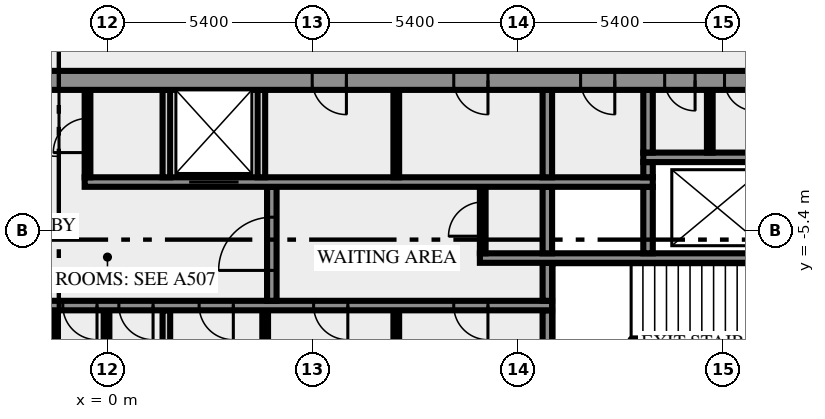
"""IFC4 building model, lengths in metres.
Left out: names, types, materials, properties, quantities, classifications, styles, units other than length and angle.
Written with IfcOpenShell. Run it as: python <this file> out.ifc"""

import sys

from ifc_helpers import new_model, si_unit, direction, frame, frame_2d, origin, place, context, subcontext, project, spatial, rectangle, extrude, element, fill, save


model = new_model("IFC4")
c1 = context("Model", 3, precision=1e-05, world=origin(), true_north=direction((0.0, 1.0)))
c2 = subcontext(c1, "Body", "Model", "MODEL_VIEW")
j1 = project(units=[si_unit("LENGTHUNIT", "METRE"), si_unit("PLANEANGLEUNIT", "RADIAN")], contexts=[c1])
p1 = place(None, origin())
s1 = spatial("IfcSite", under=j1, at=p1, CompositionType="ELEMENT")
p2 = place(p1, origin())
s2 = spatial("IfcBuilding", under=s1, at=p2, CompositionType="ELEMENT")
p3 = place(p2, frame((0.0, 0.0, 261.0)))
s3 = spatial("IfcBuildingStorey", under=s2, at=p3, CompositionType="ELEMENT", Elevation=261.0)
for number, where, z_axis, x_axis in (
    (1, (-1.425, -10.5, 0.0), (0.0, 0.0, 1.0), (0.0, 1.0, 0.0)),
    (2, (-0.025, -10.5, 0.0), (0.0, 0.0, 1.0), (0.0, 1.0, 0.0)),
):
    element("IfcWall", number, at=place(p3, frame(where, z_axis=z_axis, x_axis=x_axis)), inside=s3, PredefinedType="PARTITIONING", context=c2, shape_type="SweptSolid", body=[
        extrude(rectangle(XDim=3.0, YDim=0.15, at=frame_2d((1.5, 0.0))), origin(), (0.0, 0.0, 1.0), 3.65),
    ])
p4 = place(p3, frame((1.55, -10.5, 0.0), z_axis=(0.0, 0.0, 1.0), x_axis=(0.0, 1.0, 0.0)))
e3 = element("IfcWall", 3, at=p4, inside=s3, PredefinedType="SOLIDWALL", context=c2, shape_type="SweptSolid", body=[
    extrude(rectangle(XDim=3.0, YDim=0.2, at=frame_2d((1.5, 0.0))), origin(), (0.0, 0.0, 1.0), 3.65),
])
for number, where, z_axis, x_axis in (
    (4, (4.15, -10.5, 0.0), (0.0, 0.0, 1.0), (0.0, 1.0, 0.0)),
    (5, (7.6, -10.5, 0.0), (0.0, 0.0, 1.0), (0.0, 1.0, 0.0)),
):
    element("IfcWall", number, at=place(p3, frame(where, z_axis=z_axis, x_axis=x_axis)), inside=s3, PredefinedType="PARTITIONING", context=c2, shape_type="SweptSolid", body=[
        extrude(rectangle(XDim=3.0, YDim=0.15, at=frame_2d((1.5, 0.0))), origin(), (0.0, 0.0, 1.0), 3.65),
    ])
p5 = place(p3, frame((11.575, -10.5, 0.0), z_axis=(0.0, 0.0, 1.0), x_axis=(0.0, 1.0, 0.0)))
e6 = element("IfcWall", 6, at=p5, inside=s3, PredefinedType="SHEAR", context=c2, shape_type="SweptSolid", body=[
    extrude(rectangle(XDim=3.0, YDim=0.25, at=frame_2d((1.5, 0.0))), origin(), (0.0, 0.0, 1.0), 3.65),
])
p6 = place(p3, frame((11.7, -7.375, 0.0), z_axis=(0.0, 0.0, 1.0), x_axis=(-1.0, 0.0, 0.0)))
e7 = element("IfcWall", 7, at=p6, inside=s3, PredefinedType="SHEAR", context=c2, shape_type="SweptSolid", body=[
    extrude(rectangle(XDim=23.4, YDim=0.25, at=frame_2d((11.7, 0.0))), origin(), (0.0, 0.0, 1.0), 3.65),
])
p7 = place(p6, frame((22.225, 0.0, 0.0)))
e8 = element("IfcOpeningElement", 8, at=p7, cuts=e7, PredefinedType="OPENING", context=c2, shape_type="SweptSolid", body=[
    extrude(rectangle(XDim=0.8, YDim=2.1, at=frame_2d((0.4, 1.05))), frame((0.0, 0.135, 0.0), z_axis=(0.0, -1.0, 0.0), x_axis=(1.0, 0.0, 0.0)), (0.0, 0.0, 1.0), 0.27),
])
p8 = place(p6, frame((20.2, 0.0, 0.0)))
e9 = element("IfcOpeningElement", 9, at=p8, cuts=e7, PredefinedType="OPENING", context=c2, shape_type="SweptSolid", body=[
    extrude(rectangle(XDim=1.1, YDim=2.1, at=frame_2d((0.55, 1.05))), frame((0.0, 0.135, 0.0), z_axis=(0.0, -1.0, 0.0), x_axis=(1.0, 0.0, 0.0)), (0.0, 0.0, 1.0), 0.27),
])
p9 = place(p6, frame((17.7, 0.0, 0.0)))
e10 = element("IfcOpeningElement", 10, at=p9, cuts=e7, PredefinedType="OPENING", context=c2, shape_type="SweptSolid", body=[
    extrude(rectangle(XDim=1.1, YDim=2.1, at=frame_2d((0.55, 1.05))), frame((0.0, 0.135, 0.0), z_axis=(0.0, -1.0, 0.0), x_axis=(1.0, 0.0, 0.0)), (0.0, 0.0, 1.0), 0.27),
])
p10 = place(p6, frame((15.975, 0.0, 0.0)))
e11 = element("IfcOpeningElement", 11, at=p10, cuts=e7, PredefinedType="OPENING", context=c2, shape_type="SweptSolid", body=[
    extrude(rectangle(XDim=0.8, YDim=2.1, at=frame_2d((0.4, 1.05))), frame((0.0, 0.135, 0.0), z_axis=(0.0, -1.0, 0.0), x_axis=(1.0, 0.0, 0.0)), (0.0, 0.0, 1.0), 0.27),
])
p11 = place(p6, frame((14.75, 0.0, 0.0)))
e12 = element("IfcOpeningElement", 12, at=p11, cuts=e7, PredefinedType="OPENING", context=c2, shape_type="SweptSolid", body=[
    extrude(rectangle(XDim=0.7, YDim=2.1, at=frame_2d((0.35, 1.05))), frame((0.0, 0.135, 0.0), z_axis=(0.0, -1.0, 0.0), x_axis=(1.0, 0.0, 0.0)), (0.0, 0.0, 1.0), 0.27),
])
p12 = place(p6, frame((13.35, 0.0, 0.0)))
e13 = element("IfcOpeningElement", 13, at=p12, cuts=e7, PredefinedType="OPENING", context=c2, shape_type="SweptSolid", body=[
    extrude(rectangle(XDim=0.9, YDim=2.1, at=frame_2d((0.45, 1.05))), frame((0.0, 0.135, 0.0), z_axis=(0.0, -1.0, 0.0), x_axis=(1.0, 0.0, 0.0)), (0.0, 0.0, 1.0), 0.27),
])
p13 = place(p6, frame((11.975, 0.0, 0.0)))
e14 = element("IfcOpeningElement", 14, at=p13, cuts=e7, PredefinedType="OPENING", context=c2, shape_type="SweptSolid", body=[
    extrude(rectangle(XDim=0.9, YDim=2.1, at=frame_2d((0.45, 1.05))), frame((0.0, 0.135, 0.0), z_axis=(0.0, -1.0, 0.0), x_axis=(1.0, 0.0, 0.0)), (0.0, 0.0, 1.0), 0.27),
])
p14 = place(p6, frame((10.5, 0.0, 0.0)))
e15 = element("IfcOpeningElement", 15, at=p14, cuts=e7, PredefinedType="OPENING", context=c2, shape_type="SweptSolid", body=[
    extrude(rectangle(XDim=0.9, YDim=2.1, at=frame_2d((0.45, 1.05))), frame((0.0, 0.135, 0.0), z_axis=(0.0, -1.0, 0.0), x_axis=(1.0, 0.0, 0.0)), (0.0, 0.0, 1.0), 0.27),
])
p15 = place(p6, frame((8.388, 0.0, 0.0)))
e16 = element("IfcOpeningElement", 16, at=p15, cuts=e7, PredefinedType="OPENING", context=c2, shape_type="SweptSolid", body=[
    extrude(rectangle(XDim=0.9, YDim=2.1, at=frame_2d((0.45, 1.05))), frame((0.0, 0.135, 0.0), z_axis=(0.0, -1.0, 0.0), x_axis=(1.0, 0.0, 0.0)), (0.0, 0.0, 1.0), 0.27),
])
p16 = place(p6, frame((5.375, 0.0, 0.0)))
e17 = element("IfcOpeningElement", 17, at=p16, cuts=e7, PredefinedType="OPENING", context=c2, shape_type="SweptSolid", body=[
    extrude(rectangle(XDim=0.9, YDim=2.1, at=frame_2d((0.45, 1.05))), frame((0.0, 0.135, 0.0), z_axis=(0.0, -1.0, 0.0), x_axis=(1.0, 0.0, 0.0)), (0.0, 0.0, 1.0), 0.27),
])
p17 = place(p6, frame((1.688, 0.0, 0.0)))
e18 = element("IfcOpeningElement", 18, at=p17, cuts=e7, PredefinedType="OPENING", context=c2, shape_type="SweptSolid", body=[
    extrude(rectangle(XDim=0.9, YDim=2.1, at=frame_2d((0.45, 1.05))), frame((0.0, 0.135, 0.0), z_axis=(0.0, -1.0, 0.0), x_axis=(1.0, 0.0, 0.0)), (0.0, 0.0, 1.0), 0.27),
])
p18 = place(p3, frame((4.325, -7.25, 0.0), z_axis=(0.0, 0.0, 1.0), x_axis=(0.0, 1.0, 0.0)))
e19 = element("IfcWall", 19, at=p18, inside=s3, PredefinedType="SHEAR", context=c2, shape_type="SweptSolid", body=[
    extrude(rectangle(XDim=3.0, YDim=0.25, at=frame_2d((1.5, 0.0))), origin(), (0.0, 0.0, 1.0), 3.65),
])
p19 = place(p18, frame((0.8, 0.0, 0.0)))
e20 = element("IfcOpeningElement", 20, at=p19, cuts=e19, PredefinedType="OPENING", context=c2, shape_type="SweptSolid", body=[
    extrude(rectangle(XDim=1.4, YDim=2.1, at=frame_2d((0.7, 1.05))), frame((0.0, 0.135, 0.0), z_axis=(0.0, -1.0, 0.0), x_axis=(1.0, 0.0, 0.0)), (0.0, 0.0, 1.0), 0.27),
])
p20 = place(p3, frame((11.575, -7.25, 0.0), z_axis=(0.0, 0.0, 1.0), x_axis=(0.0, 1.0, 0.0)))
e21 = element("IfcWall", 21, at=p20, inside=s3, PredefinedType="SHEAR", context=c2, shape_type="SweptSolid", body=[
    extrude(rectangle(XDim=1.0, YDim=0.25, at=frame_2d((0.5, 0.0))), origin(), (0.0, 0.0, 1.0), 3.65),
])
p21 = place(p3, frame((20.0, -6.125, 0.0), z_axis=(0.0, 0.0, 1.0), x_axis=(-1.0, 0.0, 0.0)))
e22 = element("IfcWall", 22, at=p21, inside=s3, PredefinedType="SHEAR", context=c2, shape_type="SweptSolid", body=[
    extrude(rectangle(XDim=10.2, YDim=0.25, at=frame_2d((5.1, 0.0))), origin(), (0.0, 0.0, 1.0), 3.65),
])
p22 = place(p21, frame((0.55, 0.0, 0.0)))
e23 = element("IfcOpeningElement", 23, at=p22, cuts=e22, PredefinedType="OPENING", context=c2, shape_type="SweptSolid", body=[
    extrude(rectangle(XDim=1.8, YDim=2.1, at=frame_2d((0.9, 1.05))), frame((0.0, 0.135, 0.0), z_axis=(0.0, -1.0, 0.0), x_axis=(1.0, 0.0, 0.0)), (0.0, 0.0, 1.0), 0.27),
])
p23 = place(p3, frame((9.875, -6.0, 0.0), z_axis=(0.0, 0.0, 1.0), x_axis=(0.0, 1.0, 0.0)))
e24 = element("IfcWall", 24, at=p23, inside=s3, PredefinedType="PARTITIONING", context=c2, shape_type="SweptSolid", body=[
    extrude(rectangle(XDim=1.75, YDim=0.15, at=frame_2d((0.875, 0.0))), origin(), (0.0, 0.0, 1.0), 3.65),
])
p24 = place(p23, frame((0.45, 0.0, 0.0)))
e25 = element("IfcOpeningElement", 25, at=p24, cuts=e24, PredefinedType="OPENING", context=c2, shape_type="SweptSolid", body=[
    extrude(rectangle(XDim=0.9, YDim=2.1, at=frame_2d((0.45, 1.05))), frame((0.0, 0.085, 0.0), z_axis=(0.0, -1.0, 0.0), x_axis=(1.0, 0.0, 0.0)), (0.0, 0.0, 1.0), 0.17),
])
for number, where, z_axis, x_axis in (
    (26, (11.575, -6.0, 0.0), (0.0, 0.0, 1.0), (0.0, 1.0, 0.0)),
    (27, (14.225, -6.0, 0.0), (0.0, 0.0, 1.0), (0.0, 1.0, 0.0)),
):
    element("IfcWall", number, at=place(p3, frame(where, z_axis=z_axis, x_axis=x_axis)), inside=s3, PredefinedType="SHEAR", context=c2, shape_type="SweptSolid", body=[
        extrude(rectangle(XDim=1.75, YDim=0.25, at=frame_2d((0.875, 0.0))), origin(), (0.0, 0.0, 1.0), 3.65),
    ])
p25 = place(p3, frame((-0.6, -4.125, 0.0), z_axis=(0.0, 0.0, 1.0), x_axis=(1.0, 0.0, 0.0)))
e28 = element("IfcWall", 28, at=p25, inside=s3, PredefinedType="SHEAR", context=c2, shape_type="SweptSolid", body=[
    extrude(rectangle(XDim=14.95, YDim=0.25, at=frame_2d((7.475, 0.0))), origin(), (0.0, 0.0, 1.0), 3.65),
])
p26 = place(p25, frame((2.75, 0.0, 0.0)))
e29 = element("IfcOpeningElement", 29, at=p26, cuts=e28, PredefinedType="OPENING", context=c2, shape_type="SweptSolid", body=[
    extrude(rectangle(XDim=1.3, YDim=2.1, at=frame_2d((0.65, 1.05))), frame((0.0, 0.135, 0.0), z_axis=(0.0, -1.0, 0.0), x_axis=(1.0, 0.0, 0.0)), (0.0, 0.0, 1.0), 0.27),
])
p27 = place(p3, frame((-0.525, -4.0, 0.0), z_axis=(0.0, 0.0, 1.0), x_axis=(0.0, 1.0, 0.0)))
e30 = element("IfcWall", 30, at=p27, inside=s3, PredefinedType="PARTITIONING", context=c2, shape_type="SweptSolid", body=[
    extrude(rectangle(XDim=2.3, YDim=0.15, at=frame_2d((1.15, 0.0))), origin(), (0.0, 0.0, 1.0), 3.65),
])
p28 = place(p27, frame((0.65, 0.0, 0.0)))
e31 = element("IfcOpeningElement", 31, at=p28, cuts=e30, PredefinedType="OPENING", context=c2, shape_type="SweptSolid", body=[
    extrude(rectangle(XDim=0.9, YDim=2.1, at=frame_2d((0.45, 1.05))), frame((0.0, 0.085, 0.0), z_axis=(0.0, -1.0, 0.0), x_axis=(1.0, 0.0, 0.0)), (0.0, 0.0, 1.0), 0.17),
])
for number, where, z_axis, x_axis in (
    (32, (1.55, -4.0, 0.0), (0.0, 0.0, 1.0), (0.0, 1.0, 0.0)),
    (33, (4.05, -4.0, 0.0), (0.0, 0.0, 1.0), (0.0, 1.0, 0.0)),
):
    element("IfcWall", number, at=place(p3, frame(where, z_axis=z_axis, x_axis=x_axis)), inside=s3, PredefinedType="SOLIDWALL", context=c2, shape_type="SweptSolid", body=[
        extrude(rectangle(XDim=2.3, YDim=0.2, at=frame_2d((1.15, 0.0))), origin(), (0.0, 0.0, 1.0), 3.65),
    ])
p29 = place(p3, frame((7.6, -4.0, 0.0), z_axis=(0.0, 0.0, 1.0), x_axis=(0.0, 1.0, 0.0)))
e34 = element("IfcWall", 34, at=p29, inside=s3, PredefinedType="PARTITIONING", context=c2, shape_type="SweptSolid", body=[
    extrude(rectangle(XDim=2.3, YDim=0.15, at=frame_2d((1.15, 0.0))), origin(), (0.0, 0.0, 1.0), 3.65),
])
p30 = place(p3, frame((11.575, -4.0, 0.0), z_axis=(0.0, 0.0, 1.0), x_axis=(0.0, 1.0, 0.0)))
e35 = element("IfcWall", 35, at=p30, inside=s3, PredefinedType="SHEAR", context=c2, shape_type="SweptSolid", body=[
    extrude(rectangle(XDim=2.3, YDim=0.25, at=frame_2d((1.15, 0.0))), origin(), (0.0, 0.0, 1.0), 3.65),
])
p31 = place(p3, frame((14.225, -4.0, 0.0), z_axis=(0.0, 0.0, 1.0), x_axis=(0.0, 1.0, 0.0)))
e36 = element("IfcWall", 36, at=p31, inside=s3, PredefinedType="SHEAR", context=c2, shape_type="SweptSolid", body=[
    extrude(rectangle(XDim=0.4, YDim=0.25, at=frame_2d((0.2, 0.0))), origin(), (0.0, 0.0, 1.0), 3.65),
])
p32 = place(p3, frame((14.1, -3.475, 0.0), z_axis=(0.0, 0.0, 1.0), x_axis=(1.0, 0.0, 0.0)))
e37 = element("IfcWall", 37, at=p32, inside=s3, PredefinedType="SHEAR", context=c2, shape_type="SweptSolid", body=[
    extrude(rectangle(XDim=3.25, YDim=0.25, at=frame_2d((1.625, 0.0))), origin(), (0.0, 0.0, 1.0), 3.65),
])
p33 = place(p3, frame((14.225, -3.35, 0.0), z_axis=(0.0, 0.0, 1.0), x_axis=(0.0, 1.0, 0.0)))
e38 = element("IfcWall", 38, at=p33, inside=s3, PredefinedType="SHEAR", context=c2, shape_type="SweptSolid", body=[
    extrude(rectangle(XDim=1.65, YDim=0.25, at=frame_2d((0.825, 0.0))), origin(), (0.0, 0.0, 1.0), 3.65),
])
p34 = place(p3, frame((15.85, -3.35, 0.0), z_axis=(0.0, 0.0, 1.0), x_axis=(0.0, 1.0, 0.0)))
e39 = element("IfcWall", 39, at=p34, inside=s3, PredefinedType="PARTITIONING", context=c2, shape_type="SweptSolid", body=[
    extrude(rectangle(XDim=1.65, YDim=0.15, at=frame_2d((0.825, 0.0))), origin(), (0.0, 0.0, 1.0), 3.65),
])
p35 = place(p3, frame((20.49, -1.45, 0.0), z_axis=(0.0, 0.0, 1.0), x_axis=(-1.0, 0.0, 0.0)))
e40 = element("IfcWall", 40, at=p35, inside=s3, PredefinedType="SHEAR", context=c2, shape_type="SweptSolid", body=[
    extrude(rectangle(XDim=40.98, YDim=0.5, at=frame_2d((20.49, 0.0))), origin(), (0.0, 0.0, 1.0), 3.65),
])
p36 = place(p35, frame((38.14, 0.0, 0.0)))
e41 = element("IfcOpeningElement", 41, at=p36, cuts=e40, PredefinedType="OPENING", context=c2, shape_type="SweptSolid", body=[
    extrude(rectangle(XDim=1.8, YDim=2.1, at=frame_2d((0.9, 1.05))), frame((0.0, 0.26, 0.0), z_axis=(0.0, -1.0, 0.0), x_axis=(1.0, 0.0, 0.0)), (0.0, 0.0, 1.0), 0.52),
])
p37 = place(p35, frame((35.89, 0.0, 0.0)))
e42 = element("IfcOpeningElement", 42, at=p37, cuts=e40, PredefinedType="OPENING", context=c2, shape_type="SweptSolid", body=[
    extrude(rectangle(XDim=0.9, YDim=2.1, at=frame_2d((0.45, 1.05))), frame((0.0, 0.26, 0.0), z_axis=(0.0, -1.0, 0.0), x_axis=(1.0, 0.0, 0.0)), (0.0, 0.0, 1.0), 0.52),
])
p38 = place(p35, frame((32.94, 0.0, 0.0)))
e43 = element("IfcOpeningElement", 43, at=p38, cuts=e40, PredefinedType="OPENING", context=c2, shape_type="SweptSolid", body=[
    extrude(rectangle(XDim=0.9, YDim=2.1, at=frame_2d((0.45, 1.05))), frame((0.0, 0.26, 0.0), z_axis=(0.0, -1.0, 0.0), x_axis=(1.0, 0.0, 0.0)), (0.0, 0.0, 1.0), 0.52),
])
p39 = place(p35, frame((31.015, 0.0, 0.0)))
e44 = element("IfcOpeningElement", 44, at=p39, cuts=e40, PredefinedType="OPENING", context=c2, shape_type="SweptSolid", body=[
    extrude(rectangle(XDim=0.8, YDim=2.1, at=frame_2d((0.4, 1.05))), frame((0.0, 0.26, 0.0), z_axis=(0.0, -1.0, 0.0), x_axis=(1.0, 0.0, 0.0)), (0.0, 0.0, 1.0), 0.52),
])
p40 = place(p35, frame((24.765, 0.0, 0.0)))
e45 = element("IfcOpeningElement", 45, at=p40, cuts=e40, PredefinedType="OPENING", context=c2, shape_type="SweptSolid", body=[
    extrude(rectangle(XDim=0.8, YDim=2.1, at=frame_2d((0.4, 1.05))), frame((0.0, 0.26, 0.0), z_axis=(0.0, -1.0, 0.0), x_axis=(1.0, 0.0, 0.0)), (0.0, 0.0, 1.0), 0.52),
])
p41 = place(p35, frame((21.765, 0.0, 0.0)))
e46 = element("IfcOpeningElement", 46, at=p41, cuts=e40, PredefinedType="OPENING", context=c2, shape_type="SweptSolid", body=[
    extrude(rectangle(XDim=2.0, YDim=2.1, at=frame_2d((1.0, 1.05))), frame((0.0, 0.26, 0.0), z_axis=(0.0, -1.0, 0.0), x_axis=(1.0, 0.0, 0.0)), (0.0, 0.0, 1.0), 0.52),
])
p42 = place(p35, frame((14.202, 0.0, 0.0)))
e47 = element("IfcOpeningElement", 47, at=p42, cuts=e40, PredefinedType="OPENING", context=c2, shape_type="SweptSolid", body=[
    extrude(rectangle(XDim=0.9, YDim=2.1, at=frame_2d((0.45, 1.05))), frame((0.0, 0.26, 0.0), z_axis=(0.0, -1.0, 0.0), x_axis=(1.0, 0.0, 0.0)), (0.0, 0.0, 1.0), 0.52),
])
p43 = place(p35, frame((10.478, 0.0, 0.0)))
e48 = element("IfcOpeningElement", 48, at=p43, cuts=e40, PredefinedType="OPENING", context=c2, shape_type="SweptSolid", body=[
    extrude(rectangle(XDim=0.9, YDim=2.1, at=frame_2d((0.45, 1.05))), frame((0.0, 0.26, 0.0), z_axis=(0.0, -1.0, 0.0), x_axis=(1.0, 0.0, 0.0)), (0.0, 0.0, 1.0), 0.52),
])
p44 = place(p35, frame((7.14, 0.0, 0.0)))
e49 = element("IfcOpeningElement", 49, at=p44, cuts=e40, PredefinedType="OPENING", context=c2, shape_type="SweptSolid", body=[
    extrude(rectangle(XDim=0.9, YDim=2.1, at=frame_2d((0.45, 1.05))), frame((0.0, 0.26, 0.0), z_axis=(0.0, -1.0, 0.0), x_axis=(1.0, 0.0, 0.0)), (0.0, 0.0, 1.0), 0.52),
])
p45 = place(p35, frame((5.028, 0.0, 0.0)))
e50 = element("IfcOpeningElement", 50, at=p45, cuts=e40, PredefinedType="OPENING", context=c2, shape_type="SweptSolid", body=[
    extrude(rectangle(XDim=0.8, YDim=2.1, at=frame_2d((0.4, 1.05))), frame((0.0, 0.26, 0.0), z_axis=(0.0, -1.0, 0.0), x_axis=(1.0, 0.0, 0.0)), (0.0, 0.0, 1.0), 0.52),
])
p46 = place(p35, frame((3.452, 0.0, 0.0)))
e51 = element("IfcOpeningElement", 51, at=p46, cuts=e40, PredefinedType="OPENING", context=c2, shape_type="SweptSolid", body=[
    extrude(rectangle(XDim=0.8, YDim=2.1, at=frame_2d((0.4, 1.05))), frame((0.0, 0.26, 0.0), z_axis=(0.0, -1.0, 0.0), x_axis=(1.0, 0.0, 0.0)), (0.0, 0.0, 1.0), 0.52),
])
p47 = place(p35, frame((1.04, 0.0, 0.0)))
e52 = element("IfcOpeningElement", 52, at=p47, cuts=e40, PredefinedType="OPENING", context=c2, shape_type="SweptSolid", body=[
    extrude(rectangle(XDim=1.8, YDim=2.1, at=frame_2d((0.9, 1.05))), frame((0.0, 0.26, 0.0), z_axis=(0.0, -1.0, 0.0), x_axis=(1.0, 0.0, 0.0)), (0.0, 0.0, 1.0), 0.52),
])
p48 = place(p13, origin())
e53 = element("IfcDoor", 53, at=p48, inside=s3, OperationType="SINGLE_SWING_RIGHT", PredefinedType="DOOR", context=c2, shape_type="SweptSolid", body=[
    extrude(rectangle(XDim=0.9, YDim=2.1, at=frame_2d((0.45, 1.05))), frame((0.0, 0.025, 0.0), z_axis=(0.0, -1.0, 0.0), x_axis=(1.0, 0.0, 0.0)), (0.0, 0.0, 1.0), 0.05),
])
fill(e14, e53)
p49 = place(p14, origin())
e54 = element("IfcDoor", 54, at=p49, inside=s3, OperationType="SINGLE_SWING_LEFT", PredefinedType="DOOR", context=c2, shape_type="SweptSolid", body=[
    extrude(rectangle(XDim=0.9, YDim=2.1, at=frame_2d((0.45, 1.05))), frame((0.0, 0.025, 0.0), z_axis=(0.0, -1.0, 0.0), x_axis=(1.0, 0.0, 0.0)), (0.0, 0.0, 1.0), 0.05),
])
fill(e15, e54)
p50 = place(p15, origin())
e55 = element("IfcDoor", 55, at=p50, inside=s3, OperationType="SINGLE_SWING_LEFT", PredefinedType="DOOR", context=c2, shape_type="SweptSolid", body=[
    extrude(rectangle(XDim=0.9, YDim=2.1, at=frame_2d((0.45, 1.05))), frame((0.0, 0.025, 0.0), z_axis=(0.0, -1.0, 0.0), x_axis=(1.0, 0.0, 0.0)), (0.0, 0.0, 1.0), 0.05),
])
fill(e16, e55)
p51 = place(p16, origin())
e56 = element("IfcDoor", 56, at=p51, inside=s3, OperationType="SINGLE_SWING_LEFT", PredefinedType="DOOR", context=c2, shape_type="SweptSolid", body=[
    extrude(rectangle(XDim=0.9, YDim=2.1, at=frame_2d((0.45, 1.05))), frame((0.0, 0.025, 0.0), z_axis=(0.0, -1.0, 0.0), x_axis=(1.0, 0.0, 0.0)), (0.0, 0.0, 1.0), 0.05),
])
fill(e17, e56)
p52 = place(p17, origin())
e57 = element("IfcDoor", 57, at=p52, inside=s3, OperationType="SINGLE_SWING_LEFT", PredefinedType="DOOR", context=c2, shape_type="SweptSolid", body=[
    extrude(rectangle(XDim=0.9, YDim=2.1, at=frame_2d((0.45, 1.05))), frame((0.0, 0.025, 0.0), z_axis=(0.0, -1.0, 0.0), x_axis=(1.0, 0.0, 0.0)), (0.0, 0.0, 1.0), 0.05),
])
fill(e18, e57)
p53 = place(p19, origin())
e58 = element("IfcDoor", 58, at=p53, inside=s3, OperationType="DOUBLE_DOOR_SINGLE_SWING", PredefinedType="DOOR", context=c2, shape_type="SweptSolid", body=[
    extrude(rectangle(XDim=1.4, YDim=2.1, at=frame_2d((0.7, 1.05))), frame((0.0, 0.025, 0.0), z_axis=(0.0, -1.0, 0.0), x_axis=(1.0, 0.0, 0.0)), (0.0, 0.0, 1.0), 0.05),
])
fill(e20, e58)
p54 = place(p24, origin())
e59 = element("IfcDoor", 59, at=p54, inside=s3, OperationType="SINGLE_SWING_RIGHT", PredefinedType="DOOR", context=c2, shape_type="SweptSolid", body=[
    extrude(rectangle(XDim=0.9, YDim=2.1, at=frame_2d((0.45, 1.05))), frame((0.0, 0.025, 0.0), z_axis=(0.0, -1.0, 0.0), x_axis=(1.0, 0.0, 0.0)), (0.0, 0.0, 1.0), 0.05),
])
fill(e25, e59)
p55 = place(p26, origin())
e60 = element("IfcDoor", 60, at=p55, inside=s3, OperationType="DOUBLE_DOOR_SLIDING", PredefinedType="DOOR", context=c2, shape_type="SweptSolid", body=[
    extrude(rectangle(XDim=1.3, YDim=2.1, at=frame_2d((0.65, 1.05))), frame((0.0, 0.025, 0.0), z_axis=(0.0, -1.0, 0.0), x_axis=(1.0, 0.0, 0.0)), (0.0, 0.0, 1.0), 0.05),
])
fill(e29, e60)
p56 = place(p28, origin())
e61 = element("IfcDoor", 61, at=p56, inside=s3, OperationType="SINGLE_SWING_LEFT", PredefinedType="DOOR", context=c2, shape_type="SweptSolid", body=[
    extrude(rectangle(XDim=0.9, YDim=2.1, at=frame_2d((0.45, 1.05))), frame((0.0, 0.025, 0.0), z_axis=(0.0, -1.0, 0.0), x_axis=(1.0, 0.0, 0.0)), (0.0, 0.0, 1.0), 0.05),
])
fill(e31, e61)
p57 = place(p41, origin())
e62 = element("IfcDoor", 62, at=p57, inside=s3, OperationType="DOUBLE_DOOR_SINGLE_SWING", PredefinedType="DOOR", context=c2, shape_type="SweptSolid", body=[
    extrude(rectangle(XDim=2.0, YDim=2.1, at=frame_2d((1.0, 1.05))), frame((0.0, 0.025, 0.0), z_axis=(0.0, -1.0, 0.0), x_axis=(1.0, 0.0, 0.0)), (0.0, 0.0, 1.0), 0.05),
])
fill(e46, e62)
p58 = place(p42, origin())
e63 = element("IfcDoor", 63, at=p58, inside=s3, OperationType="SINGLE_SWING_LEFT", PredefinedType="DOOR", context=c2, shape_type="SweptSolid", body=[
    extrude(rectangle(XDim=0.9, YDim=2.1, at=frame_2d((0.45, 1.05))), frame((0.0, 0.025, 0.0), z_axis=(0.0, -1.0, 0.0), x_axis=(1.0, 0.0, 0.0)), (0.0, 0.0, 1.0), 0.05),
])
fill(e47, e63)
p59 = place(p43, origin())
e64 = element("IfcDoor", 64, at=p59, inside=s3, OperationType="SINGLE_SWING_LEFT", PredefinedType="DOOR", context=c2, shape_type="SweptSolid", body=[
    extrude(rectangle(XDim=0.9, YDim=2.1, at=frame_2d((0.45, 1.05))), frame((0.0, 0.025, 0.0), z_axis=(0.0, -1.0, 0.0), x_axis=(1.0, 0.0, 0.0)), (0.0, 0.0, 1.0), 0.05),
])
fill(e48, e64)
p60 = place(p44, origin())
e65 = element("IfcDoor", 65, at=p60, inside=s3, OperationType="SINGLE_SWING_LEFT", PredefinedType="DOOR", context=c2, shape_type="SweptSolid", body=[
    extrude(rectangle(XDim=0.9, YDim=2.1, at=frame_2d((0.45, 1.05))), frame((0.0, 0.025, 0.0), z_axis=(0.0, -1.0, 0.0), x_axis=(1.0, 0.0, 0.0)), (0.0, 0.0, 1.0), 0.05),
])
fill(e49, e65)
p61 = place(p45, origin())
e66 = element("IfcDoor", 66, at=p61, inside=s3, OperationType="SINGLE_SWING_LEFT", PredefinedType="DOOR", context=c2, shape_type="SweptSolid", body=[
    extrude(rectangle(XDim=0.8, YDim=2.1, at=frame_2d((0.4, 1.05))), frame((0.0, 0.025, 0.0), z_axis=(0.0, -1.0, 0.0), x_axis=(1.0, 0.0, 0.0)), (0.0, 0.0, 1.0), 0.05),
])
fill(e50, e66)
p62 = place(p46, origin())
e67 = element("IfcDoor", 67, at=p62, inside=s3, OperationType="SINGLE_SWING_LEFT", PredefinedType="DOOR", context=c2, shape_type="SweptSolid", body=[
    extrude(rectangle(XDim=0.8, YDim=2.1, at=frame_2d((0.4, 1.05))), frame((0.0, 0.025, 0.0), z_axis=(0.0, -1.0, 0.0), x_axis=(1.0, 0.0, 0.0)), (0.0, 0.0, 1.0), 0.05),
])
fill(e51, e67)
save(model, sys.argv[1])
